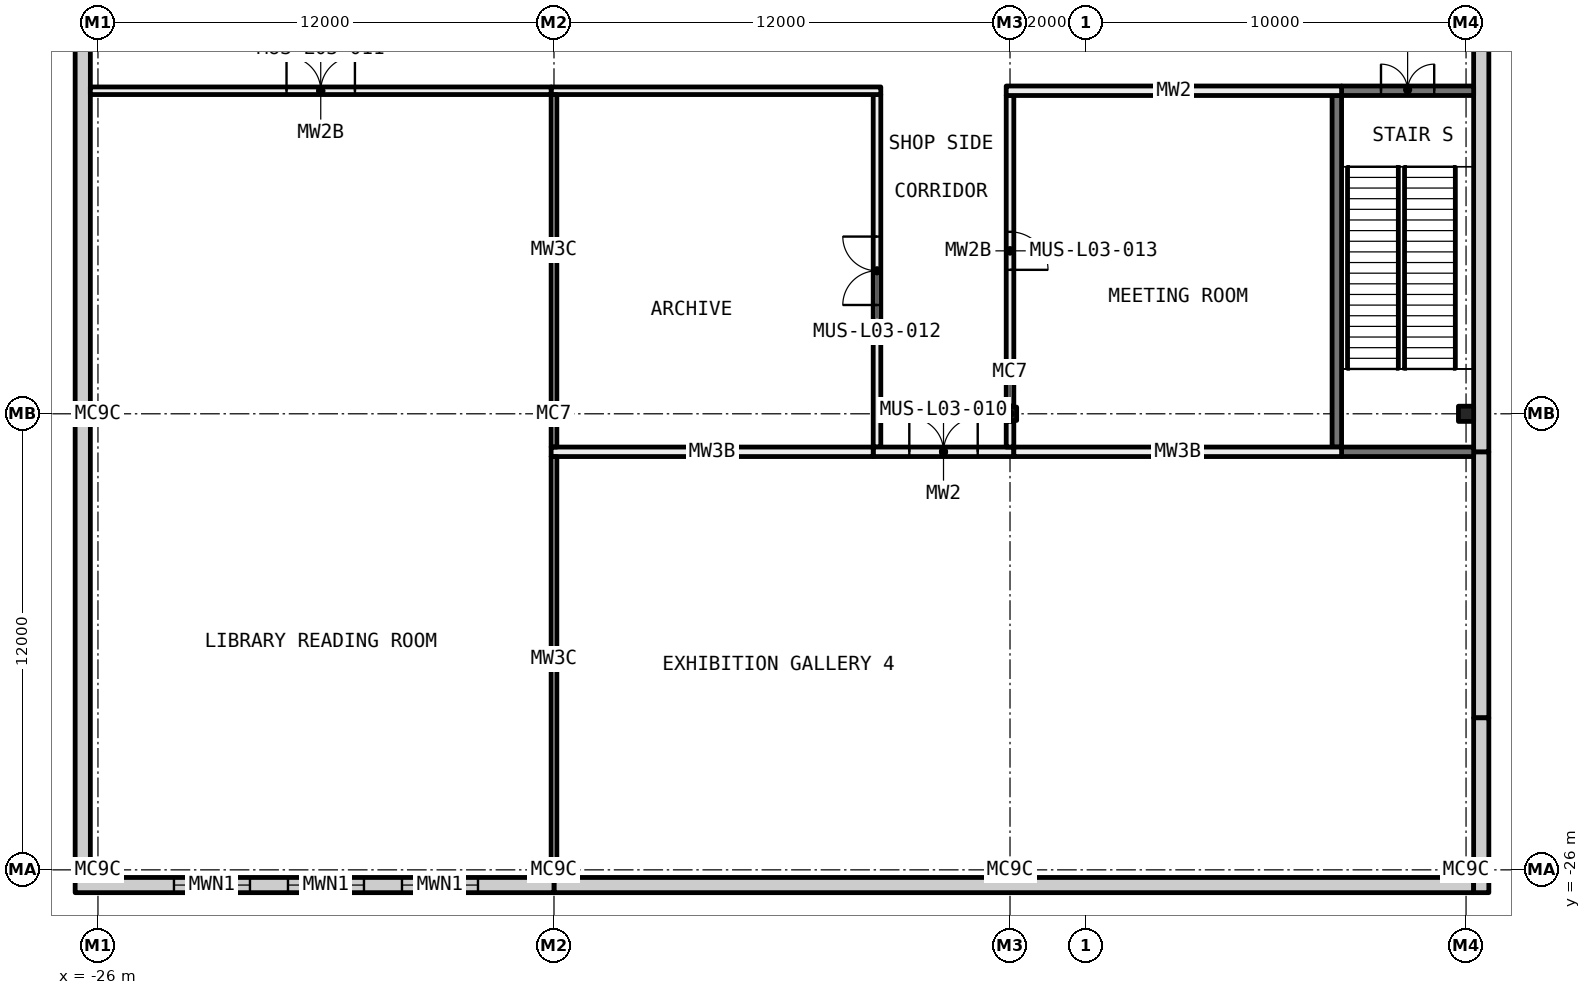
"""IFC4 building model, lengths in metres.
Left out: names, types, materials, properties, quantities, classifications, styles, units other than length and angle.
Written with IfcOpenShell. Run it as: python <this file> out.ifc"""

import sys

from ifc_helpers import new_model, si_unit, direction, frame, frame_2d, origin, origin_2d, place, context, subcontext, project, spatial, rectangle, i_section, extrude, element, fill, save


model = new_model("IFC4")
c1 = context("Model", 3, precision=1e-05, world=origin(), true_north=direction((0.0, 1.0)))
c2 = subcontext(c1, "Body", "Model", "MODEL_VIEW")
j1 = project(units=[si_unit("LENGTHUNIT", "METRE"), si_unit("PLANEANGLEUNIT", "RADIAN")], contexts=[c1])
p1 = place(None, origin())
s1 = spatial("IfcSite", under=j1, at=p1, CompositionType="ELEMENT")
p2 = place(p1, origin())
s2 = spatial("IfcBuilding", under=s1, at=p2, CompositionType="ELEMENT")
p3 = place(p2, frame((0.0, 0.0, 18.0)))
s3 = spatial("IfcBuildingStorey", under=s2, at=p3, CompositionType="ELEMENT", Elevation=18.0)
for number, where, z_axis, x_axis in (
    (1, (-26.0, -26.0, 0.0), (0.0, 0.0, 1.0), (1.0, 0.0, 0.0)),
    (2, (-26.0, -14.0, 0.0), (0.0, 0.0, 1.0), (1.0, 0.0, 0.0)),
    (3, (-14.0, -26.0, 0.0), (0.0, 0.0, 1.0), (1.0, 0.0, 0.0)),
):
    element("IfcColumn", number, at=place(p3, frame(where, z_axis=z_axis, x_axis=x_axis)), inside=s3, PredefinedType="COLUMN", context=c2, shape_type="SweptSolid", body=[
        extrude(i_section(OverallWidth=0.4, OverallDepth=0.4, WebThickness=0.013, FlangeThickness=0.021, FilletRadius=0.022, at=origin_2d()), origin(), (0.0, 0.0, 1.0), 5.6),
    ])
p4 = place(p3, frame((-14.0, -14.0, 0.0), z_axis=(0.0, 0.0, 1.0), x_axis=(1.0, 0.0, 0.0)))
e4 = element("IfcColumn", 4, at=p4, inside=s3, PredefinedType="COLUMN", context=c2, shape_type="SweptSolid", body=[
    extrude(i_section(OverallWidth=0.35, OverallDepth=0.35, WebThickness=0.012, FlangeThickness=0.019, FilletRadius=0.013, at=origin_2d()), origin(), (0.0, 0.0, 1.0), 5.6),
])
p5 = place(p3, frame((-2.0, -26.0, 0.0), z_axis=(0.0, 0.0, 1.0), x_axis=(1.0, 0.0, 0.0)))
e5 = element("IfcColumn", 5, at=p5, inside=s3, PredefinedType="COLUMN", context=c2, shape_type="SweptSolid", body=[
    extrude(i_section(OverallWidth=0.4, OverallDepth=0.4, WebThickness=0.013, FlangeThickness=0.021, FilletRadius=0.022, at=origin_2d()), origin(), (0.0, 0.0, 1.0), 5.6),
])
p6 = place(p3, frame((-2.0, -14.0, 0.0), z_axis=(0.0, 0.0, 1.0), x_axis=(1.0, 0.0, 0.0)))
e6 = element("IfcColumn", 6, at=p6, inside=s3, PredefinedType="COLUMN", context=c2, shape_type="SweptSolid", body=[
    extrude(i_section(OverallWidth=0.35, OverallDepth=0.35, WebThickness=0.012, FlangeThickness=0.019, FilletRadius=0.013, at=origin_2d()), origin(), (0.0, 0.0, 1.0), 5.6),
])
for number, where, z_axis, x_axis in (
    (7, (10.0, -26.0, 0.0), (0.0, 0.0, 1.0), (1.0, 0.0, 0.0)),
    (8, (10.0, -14.0, 0.0), (0.0, 0.0, 1.0), (1.0, 0.0, 0.0)),
):
    element("IfcColumn", number, at=place(p3, frame(where, z_axis=z_axis, x_axis=x_axis)), inside=s3, PredefinedType="COLUMN", context=c2, shape_type="SweptSolid", body=[
        extrude(i_section(OverallWidth=0.4, OverallDepth=0.4, WebThickness=0.013, FlangeThickness=0.021, FilletRadius=0.022, at=origin_2d()), origin(), (0.0, 0.0, 1.0), 5.6),
    ])
p7 = place(p3, frame((-5.5, -14.875, 0.0), z_axis=(0.0, 0.0, 1.0), x_axis=(0.0, 1.0, 0.0)))
e9 = element("IfcWall", 9, at=p7, inside=s3, PredefinedType="PARTITIONING", context=c2, shape_type="SweptSolid", body=[
    extrude(rectangle(XDim=9.275, YDim=0.2, at=frame_2d((4.637, 0.0))), origin(), (0.0, 0.0, 1.0), 5.6),
])
p8 = place(p7, frame((3.738, 0.0, 0.0)))
e10 = element("IfcOpeningElement", 10, at=p8, cuts=e9, PredefinedType="OPENING", context=c2, shape_type="SweptSolid", body=[
    extrude(rectangle(XDim=1.8, YDim=2.1, at=frame_2d((0.9, 1.05))), frame((0.0, 0.11, 0.0), z_axis=(0.0, -1.0, 0.0), x_axis=(1.0, 0.0, 0.0)), (0.0, 0.0, 1.0), 0.22),
])
p9 = place(p3, frame((-14.075, -5.5, 0.0), z_axis=(0.0, 0.0, 1.0), x_axis=(1.0, 0.0, 0.0)))
e11 = element("IfcWall", 11, at=p9, inside=s3, PredefinedType="PARTITIONING", context=c2, shape_type="SweptSolid", body=[
    extrude(rectangle(XDim=8.675, YDim=0.2, at=frame_2d((4.337, 0.0))), origin(), (0.0, 0.0, 1.0), 5.6),
])
p10 = place(p3, frame((-5.6, -15.0, 0.0), z_axis=(0.0, 0.0, 1.0), x_axis=(1.0, 0.0, 0.0)))
e12 = element("IfcWall", 12, at=p10, inside=s3, PredefinedType="PARTITIONING", context=c2, shape_type="SweptSolid", body=[
    extrude(rectangle(XDim=3.7, YDim=0.25, at=frame_2d((1.85, 0.0))), origin(), (0.0, 0.0, 1.0), 5.6),
])
p11 = place(p10, frame((0.95, 0.0, 0.0)))
e13 = element("IfcOpeningElement", 13, at=p11, cuts=e12, PredefinedType="OPENING", context=c2, shape_type="SweptSolid", body=[
    extrude(rectangle(XDim=1.8, YDim=2.1, at=frame_2d((0.9, 1.05))), frame((0.0, 0.135, 0.0), z_axis=(0.0, -1.0, 0.0), x_axis=(1.0, 0.0, 0.0)), (0.0, 0.0, 1.0), 0.27),
])
p12 = place(p3, frame((-26.2, -5.5, 0.0), z_axis=(0.0, 0.0, 1.0), x_axis=(1.0, 0.0, 0.0)))
e14 = element("IfcWall", 14, at=p12, inside=s3, PredefinedType="PARTITIONING", context=c2, shape_type="SweptSolid", body=[
    extrude(rectangle(XDim=12.125, YDim=0.2, at=frame_2d((6.062, 0.0))), origin(), (0.0, 0.0, 1.0), 5.6),
])
p13 = place(p12, frame((5.162, 0.0, 0.0)))
e15 = element("IfcOpeningElement", 15, at=p13, cuts=e14, PredefinedType="OPENING", context=c2, shape_type="SweptSolid", body=[
    extrude(rectangle(XDim=1.8, YDim=2.1, at=frame_2d((0.9, 1.05))), frame((0.0, 0.11, 0.0), z_axis=(0.0, -1.0, 0.0), x_axis=(1.0, 0.0, 0.0)), (0.0, 0.0, 1.0), 0.22),
])
p14 = place(p3, frame((-2.0, -14.875, 0.0), z_axis=(0.0, 0.0, 1.0), x_axis=(0.0, 1.0, 0.0)))
e16 = element("IfcWall", 16, at=p14, inside=s3, PredefinedType="PARTITIONING", context=c2, shape_type="SweptSolid", body=[
    extrude(rectangle(XDim=0.675, YDim=0.2, at=frame_2d((0.337, 0.0))), origin(), (0.0, 0.0, 1.0), 5.112),
])
p15 = place(p3, frame((-2.0, -13.8, 0.0), z_axis=(0.0, 0.0, 1.0), x_axis=(0.0, 1.0, 0.0)))
e17 = element("IfcWall", 17, at=p15, inside=s3, PredefinedType="PARTITIONING", context=c2, shape_type="SweptSolid", body=[
    extrude(rectangle(XDim=8.175, YDim=0.2, at=frame_2d((4.087, 0.0))), origin(), (0.0, 0.0, 1.0), 5.112),
])
p16 = place(p15, frame((3.588, 0.0, 0.0)))
e18 = element("IfcOpeningElement", 18, at=p16, cuts=e17, PredefinedType="OPENING", context=c2, shape_type="SweptSolid", body=[
    extrude(rectangle(XDim=1.0, YDim=2.1, at=frame_2d((0.5, 1.05))), frame((0.0, 0.11, 0.0), z_axis=(0.0, -1.0, 0.0), x_axis=(1.0, 0.0, 0.0)), (0.0, 0.0, 1.0), 0.22),
])
p17 = place(p3, frame((-2.1, -5.5, 0.0), z_axis=(0.0, 0.0, 1.0), x_axis=(1.0, 0.0, 0.0)))
e19 = element("IfcWall", 19, at=p17, inside=s3, PredefinedType="PARTITIONING", context=c2, shape_type="SweptSolid", body=[
    extrude(rectangle(XDim=8.825, YDim=0.25, at=frame_2d((4.413, 0.0))), origin(), (0.0, 0.0, 1.0), 5.6),
])
p18 = place(p3, frame((6.725, -5.5, 0.0), z_axis=(0.0, 0.0, 1.0), x_axis=(1.0, 0.0, 0.0)))
e20 = element("IfcWall", 20, at=p18, inside=s3, PredefinedType="SHEAR", context=c2, shape_type="SweptSolid", body=[
    extrude(rectangle(XDim=3.475, YDim=0.25, at=frame_2d((1.737, 0.0))), origin(), (0.0, 0.0, 1.0), 5.6),
])
p19 = place(p18, frame((1.037, 0.0, 0.0)))
e21 = element("IfcOpeningElement", 21, at=p19, cuts=e20, PredefinedType="OPENING", context=c2, shape_type="SweptSolid", body=[
    extrude(rectangle(XDim=1.4, YDim=2.1, at=frame_2d((0.7, 1.05))), frame((0.0, 0.135, 0.0), z_axis=(0.0, -1.0, 0.0), x_axis=(1.0, 0.0, 0.0)), (0.0, 0.0, 1.0), 0.27),
])
p20 = place(p3, frame((-14.075, -15.0, 0.0), z_axis=(0.0, 0.0, 1.0), x_axis=(1.0, 0.0, 0.0)))
e22 = element("IfcWall", 22, at=p20, inside=s3, PredefinedType="PARTITIONING", context=c2, shape_type="SweptSolid", body=[
    extrude(rectangle(XDim=8.475, YDim=0.25, at=frame_2d((4.237, 0.0))), origin(), (0.0, 0.0, 1.0), 5.6),
])
p21 = place(p3, frame((-14.0, -25.8, 0.0), z_axis=(0.0, 0.0, 1.0), x_axis=(0.0, 1.0, 0.0)))
e23 = element("IfcWall", 23, at=p21, inside=s3, PredefinedType="PARTITIONING", context=c2, shape_type="SweptSolid", body=[
    extrude(rectangle(XDim=10.675, YDim=0.15, at=frame_2d((5.337, 0.0))), origin(), (0.0, 0.0, 1.0), 5.112),
])
p22 = place(p3, frame((-1.9, -15.0, 0.0), z_axis=(0.0, 0.0, 1.0), x_axis=(1.0, 0.0, 0.0)))
e24 = element("IfcWall", 24, at=p22, inside=s3, PredefinedType="PARTITIONING", context=c2, shape_type="SweptSolid", body=[
    extrude(rectangle(XDim=8.625, YDim=0.25, at=frame_2d((4.312, 0.0))), origin(), (0.0, 0.0, 1.0), 5.6),
])
p23 = place(p3, frame((-14.0, -14.875, 0.0), z_axis=(0.0, 0.0, 1.0), x_axis=(0.0, 1.0, 0.0)))
e25 = element("IfcWall", 25, at=p23, inside=s3, PredefinedType="PARTITIONING", context=c2, shape_type="SweptSolid", body=[
    extrude(rectangle(XDim=0.675, YDim=0.15, at=frame_2d((0.337, 0.0))), origin(), (0.0, 0.0, 1.0), 5.112),
])
p24 = place(p3, frame((-14.0, -13.8, 0.0), z_axis=(0.0, 0.0, 1.0), x_axis=(0.0, 1.0, 0.0)))
e26 = element("IfcWall", 26, at=p24, inside=s3, PredefinedType="PARTITIONING", context=c2, shape_type="SweptSolid", body=[
    extrude(rectangle(XDim=8.2, YDim=0.15, at=frame_2d((4.1, 0.0))), origin(), (0.0, 0.0, 1.0), 5.112),
])
p25 = place(p3, frame((6.725, -15.0, 0.0), z_axis=(0.0, 0.0, 1.0), x_axis=(1.0, 0.0, 0.0)))
e27 = element("IfcWall", 27, at=p25, inside=s3, PredefinedType="SHEAR", context=c2, shape_type="SweptSolid", body=[
    extrude(rectangle(XDim=3.475, YDim=0.25, at=frame_2d((1.737, 0.0))), origin(), (0.0, 0.0, 1.0), 5.6),
])
p26 = place(p3, frame((6.6, -14.875, 0.0), z_axis=(0.0, 0.0, 1.0), x_axis=(0.0, 1.0, 0.0)))
e28 = element("IfcWall", 28, at=p26, inside=s3, PredefinedType="SHEAR", context=c2, shape_type="SweptSolid", body=[
    extrude(rectangle(XDim=9.25, YDim=0.25, at=frame_2d((4.625, 0.0))), origin(), (0.0, 0.0, 1.0), 5.6),
])
p27 = place(p3, frame((-14.0, -26.4, -0.4), z_axis=(0.0, 0.0, 1.0), x_axis=(1.0, 0.0, 0.0)))
e29 = element("IfcWall", 29, at=p27, inside=s3, PredefinedType="STANDARD", context=c2, shape_type="SweptSolid", body=[
    extrude(rectangle(XDim=24.2, YDim=0.4, at=frame_2d((12.1, 0.0))), origin(), (0.0, 0.0, 1.0), 6.0),
])
p28 = place(p3, frame((10.4, -22.0, -0.4), z_axis=(0.0, 0.0, 1.0), x_axis=(0.0, 1.0, 0.0)))
e30 = element("IfcWall", 30, at=p28, inside=s3, PredefinedType="STANDARD", context=c2, shape_type="SweptSolid", body=[
    extrude(rectangle(XDim=7.0, YDim=0.4, at=frame_2d((3.5, 0.0))), origin(), (0.0, 0.0, 1.0), 6.0),
])
p29 = place(p3, frame((-26.6, -26.4, -0.4), z_axis=(0.0, 0.0, 1.0), x_axis=(1.0, 0.0, 0.0)))
e31 = element("IfcWall", 31, at=p29, inside=s3, PredefinedType="STANDARD", context=c2, shape_type="SweptSolid", body=[
    extrude(rectangle(XDim=12.6, YDim=0.4, at=frame_2d((6.3, 0.0))), origin(), (0.0, 0.0, 1.0), 6.0),
])
p30 = place(p29, frame((2.6, 0.0, 1.3)))
e32 = element("IfcOpeningElement", 32, at=p30, cuts=e31, PredefinedType="OPENING", context=c2, shape_type="SweptSolid", body=[
    extrude(rectangle(XDim=2.0, YDim=3.6, at=frame_2d((1.0, 1.8))), frame((0.0, 0.21, 0.0), z_axis=(0.0, -1.0, 0.0), x_axis=(1.0, 0.0, 0.0)), (0.0, 0.0, 1.0), 0.42),
])
p31 = place(p29, frame((5.6, 0.0, 1.3)))
e33 = element("IfcOpeningElement", 33, at=p31, cuts=e31, PredefinedType="OPENING", context=c2, shape_type="SweptSolid", body=[
    extrude(rectangle(XDim=2.0, YDim=3.6, at=frame_2d((1.0, 1.8))), frame((0.0, 0.21, 0.0), z_axis=(0.0, -1.0, 0.0), x_axis=(1.0, 0.0, 0.0)), (0.0, 0.0, 1.0), 0.42),
])
p32 = place(p29, frame((8.6, 0.0, 1.3)))
e34 = element("IfcOpeningElement", 34, at=p32, cuts=e31, PredefinedType="OPENING", context=c2, shape_type="SweptSolid", body=[
    extrude(rectangle(XDim=2.0, YDim=3.6, at=frame_2d((1.0, 1.8))), frame((0.0, 0.21, 0.0), z_axis=(0.0, -1.0, 0.0), x_axis=(1.0, 0.0, 0.0)), (0.0, 0.0, 1.0), 0.42),
])
p33 = place(p3, frame((10.4, -26.6, -0.4), z_axis=(0.0, 0.0, 1.0), x_axis=(0.0, 1.0, 0.0)))
e35 = element("IfcWall", 35, at=p33, inside=s3, PredefinedType="STANDARD", context=c2, shape_type="SweptSolid", body=[
    extrude(rectangle(XDim=4.6, YDim=0.4, at=frame_2d((2.3, 0.0))), origin(), (0.0, 0.0, 1.0), 6.0),
])
p34 = place(p3, frame((-26.4, -26.2, -0.4), z_axis=(0.0, 0.0, 1.0), x_axis=(0.0, 1.0, 0.0)))
e36 = element("IfcWall", 36, at=p34, inside=s3, PredefinedType="STANDARD", context=c2, shape_type="SweptSolid", body=[
    extrude(rectangle(XDim=72.4, YDim=0.4, at=frame_2d((36.2, 0.0))), origin(), (0.0, 0.0, 1.0), 6.0),
])
p35 = place(p34, frame((27.7, 0.0, 1.3)))
e37 = element("IfcOpeningElement", 37, at=p35, cuts=e36, PredefinedType="OPENING", context=c2, shape_type="SweptSolid", body=[
    extrude(rectangle(XDim=2.0, YDim=3.6, at=frame_2d((1.0, 1.8))), frame((0.0, 0.21, 0.0), z_axis=(0.0, -1.0, 0.0), x_axis=(1.0, 0.0, 0.0)), (0.0, 0.0, 1.0), 0.42),
])
p36 = place(p34, frame((30.7, 0.0, 1.3)))
e38 = element("IfcOpeningElement", 38, at=p36, cuts=e36, PredefinedType="OPENING", context=c2, shape_type="SweptSolid", body=[
    extrude(rectangle(XDim=2.0, YDim=3.6, at=frame_2d((1.0, 1.8))), frame((0.0, 0.21, 0.0), z_axis=(0.0, -1.0, 0.0), x_axis=(1.0, 0.0, 0.0)), (0.0, 0.0, 1.0), 0.42),
])
p37 = place(p34, frame((33.2, 0.0, 1.3)))
e39 = element("IfcOpeningElement", 39, at=p37, cuts=e36, PredefinedType="OPENING", context=c2, shape_type="SweptSolid", body=[
    extrude(rectangle(XDim=2.0, YDim=3.6, at=frame_2d((1.0, 1.8))), frame((0.0, 0.21, 0.0), z_axis=(0.0, -1.0, 0.0), x_axis=(1.0, 0.0, 0.0)), (0.0, 0.0, 1.0), 0.42),
])
p38 = place(p34, frame((39.7, 0.0, 1.3)))
e40 = element("IfcOpeningElement", 40, at=p38, cuts=e36, PredefinedType="OPENING", context=c2, shape_type="SweptSolid", body=[
    extrude(rectangle(XDim=2.0, YDim=3.6, at=frame_2d((1.0, 1.8))), frame((0.0, 0.21, 0.0), z_axis=(0.0, -1.0, 0.0), x_axis=(1.0, 0.0, 0.0)), (0.0, 0.0, 1.0), 0.42),
])
p39 = place(p34, frame((42.7, 0.0, 1.3)))
e41 = element("IfcOpeningElement", 41, at=p39, cuts=e36, PredefinedType="OPENING", context=c2, shape_type="SweptSolid", body=[
    extrude(rectangle(XDim=2.0, YDim=3.6, at=frame_2d((1.0, 1.8))), frame((0.0, 0.21, 0.0), z_axis=(0.0, -1.0, 0.0), x_axis=(1.0, 0.0, 0.0)), (0.0, 0.0, 1.0), 0.42),
])
p40 = place(p34, frame((49.7, 0.0, 1.3)))
e42 = element("IfcOpeningElement", 42, at=p40, cuts=e36, PredefinedType="OPENING", context=c2, shape_type="SweptSolid", body=[
    extrude(rectangle(XDim=2.0, YDim=3.6, at=frame_2d((1.0, 1.8))), frame((0.0, 0.21, 0.0), z_axis=(0.0, -1.0, 0.0), x_axis=(1.0, 0.0, 0.0)), (0.0, 0.0, 1.0), 0.42),
])
p41 = place(p34, frame((53.7, 0.0, 1.3)))
e43 = element("IfcOpeningElement", 43, at=p41, cuts=e36, PredefinedType="OPENING", context=c2, shape_type="SweptSolid", body=[
    extrude(rectangle(XDim=2.0, YDim=3.6, at=frame_2d((1.0, 1.8))), frame((0.0, 0.21, 0.0), z_axis=(0.0, -1.0, 0.0), x_axis=(1.0, 0.0, 0.0)), (0.0, 0.0, 1.0), 0.42),
])
p42 = place(p34, frame((56.7, 0.0, 1.3)))
e44 = element("IfcOpeningElement", 44, at=p42, cuts=e36, PredefinedType="OPENING", context=c2, shape_type="SweptSolid", body=[
    extrude(rectangle(XDim=2.0, YDim=3.6, at=frame_2d((1.0, 1.8))), frame((0.0, 0.21, 0.0), z_axis=(0.0, -1.0, 0.0), x_axis=(1.0, 0.0, 0.0)), (0.0, 0.0, 1.0), 0.42),
])
p43 = place(p34, frame((62.2, 0.0, 1.3)))
e45 = element("IfcOpeningElement", 45, at=p43, cuts=e36, PredefinedType="OPENING", context=c2, shape_type="SweptSolid", body=[
    extrude(rectangle(XDim=2.0, YDim=3.6, at=frame_2d((1.0, 1.8))), frame((0.0, 0.21, 0.0), z_axis=(0.0, -1.0, 0.0), x_axis=(1.0, 0.0, 0.0)), (0.0, 0.0, 1.0), 0.42),
])
p44 = place(p34, frame((65.7, 0.0, 1.3)))
e46 = element("IfcOpeningElement", 46, at=p44, cuts=e36, PredefinedType="OPENING", context=c2, shape_type="SweptSolid", body=[
    extrude(rectangle(XDim=2.0, YDim=3.6, at=frame_2d((1.0, 1.8))), frame((0.0, 0.21, 0.0), z_axis=(0.0, -1.0, 0.0), x_axis=(1.0, 0.0, 0.0)), (0.0, 0.0, 1.0), 0.42),
])
p45 = place(p3, frame((10.4, -15.0, -0.4), z_axis=(0.0, 0.0, 1.0), x_axis=(0.0, 1.0, 0.0)))
e47 = element("IfcWall", 47, at=p45, inside=s3, PredefinedType="STANDARD", context=c2, shape_type="SweptSolid", body=[
    extrude(rectangle(XDim=13.2, YDim=0.4, at=frame_2d((6.6, 0.0))), origin(), (0.0, 0.0, 1.0), 6.0),
])
p46 = place(p30, origin())
e48 = element("IfcWindow", 48, at=p46, inside=s3, PartitioningType="SINGLE_PANEL", PredefinedType="WINDOW", context=c2, shape_type="SweptSolid", body=[
    extrude(rectangle(XDim=2.0, YDim=3.6, at=frame_2d((1.0, 1.8))), frame((0.0, 0.03, 0.0), z_axis=(0.0, -1.0, 0.0), x_axis=(1.0, 0.0, 0.0)), (0.0, 0.0, 1.0), 0.06),
])
fill(e32, e48)
p47 = place(p31, origin())
e49 = element("IfcWindow", 49, at=p47, inside=s3, PartitioningType="SINGLE_PANEL", PredefinedType="WINDOW", context=c2, shape_type="SweptSolid", body=[
    extrude(rectangle(XDim=2.0, YDim=3.6, at=frame_2d((1.0, 1.8))), frame((0.0, 0.03, 0.0), z_axis=(0.0, -1.0, 0.0), x_axis=(1.0, 0.0, 0.0)), (0.0, 0.0, 1.0), 0.06),
])
fill(e33, e49)
p48 = place(p32, origin())
e50 = element("IfcWindow", 50, at=p48, inside=s3, PartitioningType="SINGLE_PANEL", PredefinedType="WINDOW", context=c2, shape_type="SweptSolid", body=[
    extrude(rectangle(XDim=2.0, YDim=3.6, at=frame_2d((1.0, 1.8))), frame((0.0, 0.03, 0.0), z_axis=(0.0, -1.0, 0.0), x_axis=(1.0, 0.0, 0.0)), (0.0, 0.0, 1.0), 0.06),
])
fill(e34, e50)
p49 = place(p19, origin())
e51 = element("IfcDoor", 51, at=p49, inside=s3, OperationType="DOUBLE_DOOR_SINGLE_SWING", PredefinedType="DOOR", context=c2, shape_type="SweptSolid", body=[
    extrude(rectangle(XDim=1.4, YDim=2.1, at=frame_2d((0.7, 1.05))), frame((0.0, 0.025, 0.0), z_axis=(0.0, -1.0, 0.0), x_axis=(1.0, 0.0, 0.0)), (0.0, 0.0, 1.0), 0.05),
])
fill(e21, e51)
p50 = place(p11, origin())
e52 = element("IfcDoor", 52, at=p50, inside=s3, OperationType="DOUBLE_DOOR_SINGLE_SWING", PredefinedType="DOOR", context=c2, shape_type="SweptSolid", body=[
    extrude(rectangle(XDim=1.8, YDim=2.1, at=frame_2d((0.9, 1.05))), frame((0.0, 0.025, 0.0), z_axis=(0.0, -1.0, 0.0), x_axis=(1.0, 0.0, 0.0)), (0.0, 0.0, 1.0), 0.05),
])
fill(e13, e52)
p51 = place(p13, origin())
e53 = element("IfcDoor", 53, at=p51, inside=s3, OperationType="DOUBLE_DOOR_SINGLE_SWING", PredefinedType="DOOR", context=c2, shape_type="SweptSolid", body=[
    extrude(rectangle(XDim=1.8, YDim=2.1, at=frame_2d((0.9, 1.05))), frame((0.0, 0.025, 0.0), z_axis=(0.0, -1.0, 0.0), x_axis=(1.0, 0.0, 0.0)), (0.0, 0.0, 1.0), 0.05),
])
fill(e15, e53)
p52 = place(p8, origin())
e54 = element("IfcDoor", 54, at=p52, inside=s3, OperationType="DOUBLE_DOOR_SINGLE_SWING", PredefinedType="DOOR", context=c2, shape_type="SweptSolid", body=[
    extrude(rectangle(XDim=1.8, YDim=2.1, at=frame_2d((0.9, 1.05))), frame((0.0, 0.025, 0.0), z_axis=(0.0, -1.0, 0.0), x_axis=(1.0, 0.0, 0.0)), (0.0, 0.0, 1.0), 0.05),
])
fill(e10, e54)
p53 = place(p16, frame((1.0, 0.0, 0.0), x_axis=(-1.0, 0.0, 0.0)))
e55 = element("IfcDoor", 55, at=p53, inside=s3, OperationType="SINGLE_SWING_LEFT", PredefinedType="DOOR", context=c2, shape_type="SweptSolid", body=[
    extrude(rectangle(XDim=1.0, YDim=2.1, at=frame_2d((0.5, 1.05))), frame((0.0, 0.025, 0.0), z_axis=(0.0, -1.0, 0.0), x_axis=(1.0, 0.0, 0.0)), (0.0, 0.0, 1.0), 0.05),
])
fill(e18, e55)
save(model, sys.argv[1])
